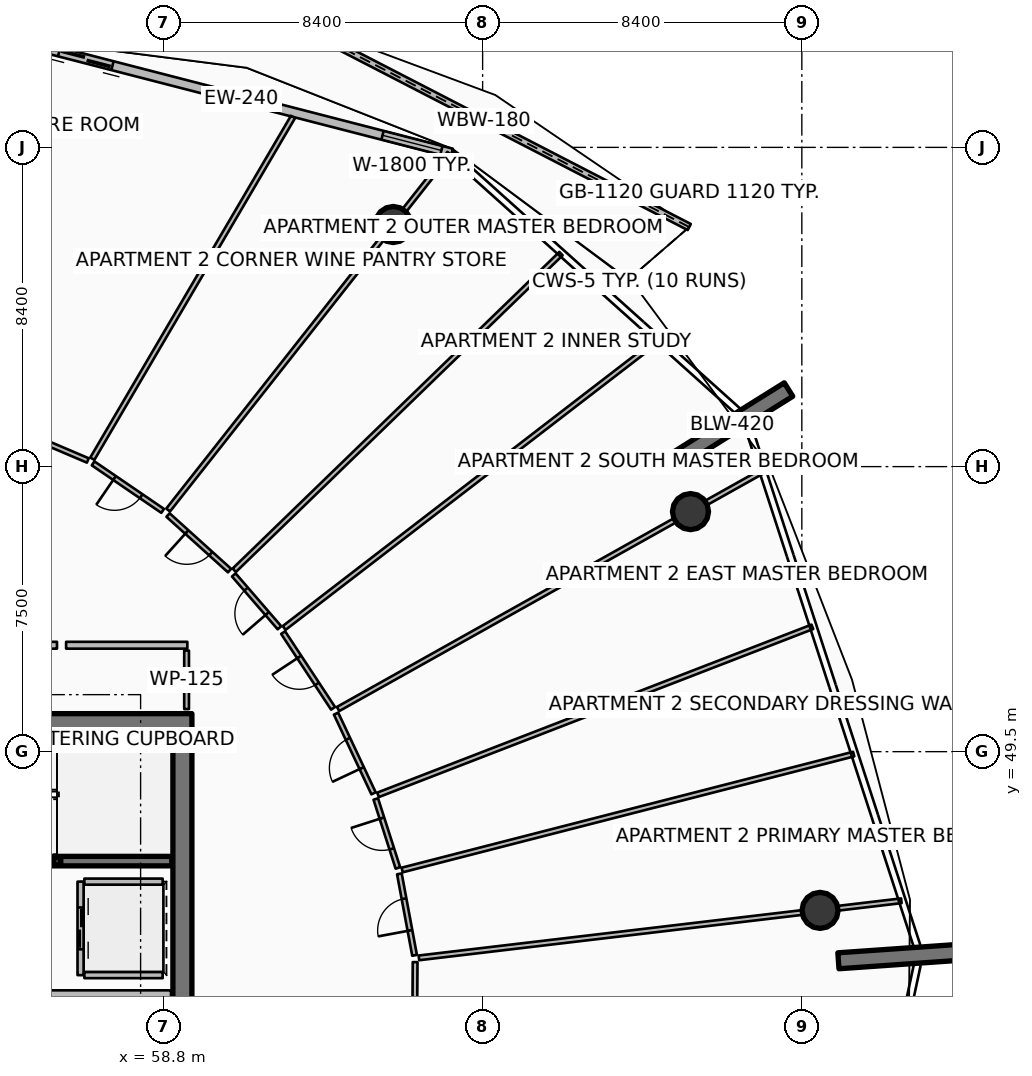
"""IFC4 building model, lengths in metres.
Left out: names, types, materials, properties, quantities, classifications, styles, units other than length and angle.
Written with IfcOpenShell. Run it as: python <this file> out.ifc"""

import sys

from ifc_helpers import new_model, si_unit, direction, frame, frame_2d, origin, origin_2d, place, context, subcontext, project, spatial, polyline, rectangle, hollow_rectangle, circle, outline, extrude, element, fill, save


model = new_model("IFC4")
c1 = context("Model", 3, precision=1e-05, world=origin(), true_north=direction((0.0, 1.0)))
c2 = subcontext(c1, "Body", "Model", "MODEL_VIEW")
j1 = project(units=[si_unit("LENGTHUNIT", "METRE"), si_unit("PLANEANGLEUNIT", "RADIAN")], contexts=[c1])
p1 = place(None, origin())
s1 = spatial("IfcSite", under=j1, at=p1, CompositionType="ELEMENT")
p2 = place(p1, origin())
s2 = spatial("IfcBuilding", under=s1, at=p2, CompositionType="ELEMENT")
p3 = place(p2, frame((0.0, 0.0, 302.15)))
s3 = spatial("IfcBuildingStorey", under=s2, at=p3, CompositionType="ELEMENT", Elevation=302.15)
p4 = place(p3, frame((49.95, 50.25, 0.0), z_axis=(0.0, 0.0, 1.0), x_axis=(1.0, 0.0, 0.0)))
e1 = element("IfcWall", 1, at=p4, inside=s3, PredefinedType="SHEAR", context=c2, shape_type="SweptSolid", body=[
    extrude(rectangle(XDim=9.6, YDim=0.5, at=frame_2d((4.8, 0.0))), origin(), (0.0, 0.0, 1.0), 3.85),
])
p5 = place(p3, frame((59.3, 34.0, 0.0), z_axis=(0.0, 0.0, 1.0), x_axis=(0.0, 1.0, 0.0)))
e2 = element("IfcWall", 2, at=p5, inside=s3, PredefinedType="SHEAR", context=c2, shape_type="SweptSolid", body=[
    extrude(rectangle(XDim=16.0, YDim=0.5, at=frame_2d((8.0, 0.0))), origin(), (0.0, 0.0, 1.0), 3.85),
])
p6 = place(p3, frame((56.0, 46.62, 0.0), z_axis=(0.0, 0.0, 1.0), x_axis=(1.0, 0.0, 0.0)))
e3 = element("IfcColumn", 3, at=p6, inside=s3, PredefinedType="COLUMN", context=c2, shape_type="SweptSolid", body=[
    extrude(hollow_rectangle(XDim=0.2, YDim=0.2, WallThickness=0.01, InnerFilletRadius=0.01, OuterFilletRadius=0.02, at=origin_2d()), origin(), (0.0, 0.0, 1.0), 1.72),
])
p7 = place(p3, frame((72.281, 57.173, 0.0), z_axis=(0.0, 0.0, 1.0), x_axis=(0.848033572426, 0.529942506352, 0.0)))
e4 = element("IfcWall", 4, at=p7, inside=s3, PredefinedType="SOLIDWALL", context=c2, shape_type="SweptSolid", body=[
    extrude(rectangle(XDim=3.5, YDim=0.42, at=frame_2d((1.75, 0.0))), origin(), (0.0, 0.0, 1.0), 3.85),
])
p8 = place(p3, frame((76.562, 43.997, 0.0), z_axis=(0.0, 0.0, 1.0), x_axis=(0.997563824095, 0.069759707979, 0.0)))
e5 = element("IfcWall", 5, at=p8, inside=s3, PredefinedType="SOLIDWALL", context=c2, shape_type="SweptSolid", body=[
    extrude(rectangle(XDim=3.5, YDim=0.42, at=frame_2d((1.75, 0.0))), origin(), (0.0, 0.0, 1.0), 3.85),
])
p9 = place(p3, frame((72.67, 55.816, 0.0), z_axis=(-0.282704029818, -0.158322289965, 0.94605099441), x_axis=(0.488622242654, -0.872495446397, 0.0)))
e6 = element("IfcColumn", 6, at=p9, inside=s3, PredefinedType="COLUMN", context=c2, shape_type="SweptSolid", body=[
    extrude(circle(Radius=0.475, at=origin_2d()), origin(), (0.0, 0.0, 1.0), 3.647),
])
p10 = place(p3, frame((64.847, 63.371, 0.0), z_axis=(-0.193753641648, -0.245837953919, 0.949749033567), x_axis=(0.78539361544, -0.618996663017, 0.0)))
e7 = element("IfcColumn", 7, at=p10, inside=s3, PredefinedType="COLUMN", context=c2, shape_type="SweptSolid", body=[
    extrude(circle(Radius=0.475, at=origin_2d()), origin(), (0.0, 0.0, 1.0), 3.633),
])
p11 = place(p3, frame((76.08, 45.323, 0.0), z_axis=(-0.321796334521, -0.038090724848, 0.946042396391), x_axis=(0.117548410709, -0.993067153389, 0.0)))
e8 = element("IfcColumn", 8, at=p11, inside=s3, PredefinedType="COLUMN", context=c2, shape_type="SweptSolid", body=[
    extrude(circle(Radius=0.475, at=origin_2d()), origin(), (0.0, 0.0, 1.0), 3.647),
])
p12 = place(p3, frame((72.637, 63.304, 0.0), z_axis=(0.0, 0.0, 1.0), x_axis=(-0.888586869338, 0.458708377556, 0.0)))
e9 = element("IfcWall", 9, at=p12, inside=s3, PredefinedType="PARAPET", context=c2, shape_type="SweptSolid", body=[
    extrude(outline(polyline([(0.0, 0.0), (12.16, 0.0), (12.16, 1.148), (6.08, 1.284), (0.0, 1.483), (0.0, 0.0)])), frame((0.0, 0.09, 0.0), z_axis=(0.0, -1.0, 0.0), x_axis=(1.0, 0.0, 0.0)), (0.0, 0.0, 1.0), 0.18),
])
p13 = place(p3, frame((66.386, 65.249, 0.0), z_axis=(0.0, 0.0, 1.0), x_axis=(-0.968343758421, 0.249620442927, 0.0)))
e10 = element("IfcWall", 10, at=p13, inside=s3, PredefinedType="SOLIDWALL", context=c2, shape_type="SweptSolid", body=[
    extrude(rectangle(XDim=11.438, YDim=0.24, at=frame_2d((5.719, 0.0))), origin(), (0.0, 0.0, 1.0), 2.4),
])
p14 = place(p13, frame((9.218, 0.0, 0.0)))
e11 = element("IfcOpeningElement", 11, at=p14, cuts=e10, PredefinedType="OPENING", context=c2, shape_type="SweptSolid", body=[
    extrude(rectangle(XDim=1.45, YDim=2.15, at=frame_2d((0.725, 1.075))), frame((0.0, 0.13, 0.0), z_axis=(0.0, -1.0, 0.0), x_axis=(1.0, 0.0, 0.0)), (0.0, 0.0, 1.0), 0.26),
])
p15 = place(p13, frame((0.28, 0.0, 0.65)))
e12 = element("IfcOpeningElement", 12, at=p15, cuts=e10, PredefinedType="OPENING", context=c2, shape_type="SweptSolid", body=[
    extrude(rectangle(XDim=1.6, YDim=1.5, at=frame_2d((0.8, 0.75))), frame((0.0, 0.13, 0.0), z_axis=(0.0, -1.0, 0.0), x_axis=(1.0, 0.0, 0.0)), (0.0, 0.0, 1.0), 0.26),
])
p16 = place(p3, frame((51.48, 46.62, 0.0), z_axis=(0.0, 0.0, 1.0), x_axis=(1.0, 0.0, 0.0)))
e13 = element("IfcWall", 13, at=p16, inside=s3, PredefinedType="SOLIDWALL", context=c2, shape_type="SweptSolid", body=[
    extrude(rectangle(XDim=7.54, YDim=0.25, at=frame_2d((3.77, 0.0))), origin(), (0.0, 0.0, 1.0), 3.45),
])
p17 = place(p16, frame((0.3, 0.0, 0.0)))
e14 = element("IfcOpeningElement", 14, at=p17, cuts=e13, PredefinedType="OPENING", context=c2, shape_type="SweptSolid", body=[
    extrude(rectangle(XDim=1.55, YDim=2.15, at=frame_2d((0.775, 1.075))), frame((0.0, 0.135, 0.0), z_axis=(0.0, -1.0, 0.0), x_axis=(1.0, 0.0, 0.0)), (0.0, 0.0, 1.0), 0.27),
])
p18 = place(p3, frame((56.62, 46.08, 0.0), z_axis=(0.0, 0.0, 1.0), x_axis=(0.0, -1.0, 0.0)))
e15 = element("IfcWall", 15, at=p18, inside=s3, PredefinedType="PARTITIONING", context=c2, shape_type="SweptSolid", body=[
    extrude(rectangle(XDim=2.46, YDim=0.16, at=frame_2d((1.23, 0.0))), origin(), (0.0, 0.0, 1.0), 3.45),
])
p19 = place(p18, frame((0.68, 0.0, 0.0)))
e16 = element("IfcOpeningElement", 16, at=p19, cuts=e15, PredefinedType="OPENING", context=c2, shape_type="SweptSolid", body=[
    extrude(rectangle(XDim=1.1, YDim=2.1, at=frame_2d((0.55, 1.05))), frame((0.0, 0.09, 0.0), z_axis=(0.0, -1.0, 0.0), x_axis=(1.0, 0.0, 0.0)), (0.0, 0.0, 1.0), 0.18),
])
for number, where, z_axis, x_axis in (
    (17, (56.72, 46.08, 0.0), (0.0, 0.0, 1.0), (1.0, 0.0, 0.0)),
    (18, (56.72, 43.62, 0.0), (0.0, 0.0, 1.0), (1.0, 0.0, 0.0)),
):
    element("IfcWall", number, at=place(p3, frame(where, z_axis=z_axis, x_axis=x_axis)), inside=s3, PredefinedType="PARTITIONING", context=c2, shape_type="SweptSolid", body=[
        extrude(rectangle(XDim=2.06, YDim=0.16, at=frame_2d((1.03, 0.0))), origin(), (0.0, 0.0, 1.0), 3.45),
    ])
p20 = place(p3, frame((50.12, 43.12, 0.0), z_axis=(0.0, 0.0, 1.0), x_axis=(1.0, 0.0, 0.0)))
e19 = element("IfcWall", 19, at=p20, inside=s3, PredefinedType="PARTITIONING", context=c2, shape_type="SweptSolid", body=[
    extrude(rectangle(XDim=8.88, YDim=0.2, at=frame_2d((4.44, 0.0))), origin(), (0.0, 0.0, 1.0), 3.45),
])
p21 = place(p3, frame((59.41, 50.62, 0.0), z_axis=(0.0, 0.0, 1.0), x_axis=(0.0, 1.0, 0.0)))
e20 = element("IfcWall", 20, at=p21, inside=s3, PredefinedType="PARTITIONING", context=c2, shape_type="SweptSolid", body=[
    extrude(rectangle(XDim=1.54, YDim=0.125, at=frame_2d((0.77, 0.0))), origin(), (0.0, 0.0, 1.0), 2.89),
])
p22 = place(p3, frame((65.398, 39.799, 0.0), z_axis=(0.0, 0.0, 1.0), x_axis=(0.006274064384, 0.999980317864, 0.0)))
e21 = element("IfcWall", 21, at=p22, inside=s3, PredefinedType="PARTITIONING", context=c2, shape_type="SweptSolid", body=[
    extrude(rectangle(XDim=4.164, YDim=0.125, at=frame_2d((2.082, 0.0))), origin(), (0.0, 0.0, 1.0), 2.407),
])
p23 = place(p22, frame((1.632, 0.0, 0.0)))
e22 = element("IfcOpeningElement", 22, at=p23, cuts=e21, PredefinedType="OPENING", context=c2, shape_type="SweptSolid", body=[
    extrude(rectangle(XDim=0.9, YDim=2.08, at=frame_2d((0.45, 1.04))), frame((0.0, 0.073, 0.0), z_axis=(0.0, -1.0, 0.0), x_axis=(1.0, 0.0, 0.0)), (0.0, 0.0, 1.0), 0.145),
])
p24 = place(p3, frame((65.524, 44.074, 0.0), z_axis=(0.0, 0.0, 1.0), x_axis=(0.993069543008, 0.117528221075, 0.0)))
e23 = element("IfcWall", 23, at=p24, inside=s3, PredefinedType="PARTITIONING", context=c2, shape_type="SweptSolid", body=[
    extrude(rectangle(XDim=12.784, YDim=0.125, at=frame_2d((6.392, 0.0))), origin(), (0.0, 0.0, 1.0), 2.407),
])
p25 = place(p3, frame((65.082, 46.386, 0.0), z_axis=(0.0, 0.0, 1.0), x_axis=(0.968583522114, 0.248688481217, 0.0)))
e24 = element("IfcWall", 24, at=p25, inside=s3, PredefinedType="PARTITIONING", context=c2, shape_type="SweptSolid", body=[
    extrude(rectangle(XDim=12.268, YDim=0.125, at=frame_2d((6.134, 0.0))), origin(), (0.0, 0.0, 1.0), 2.425),
])
p26 = place(p3, frame((64.448, 48.363, 0.0), z_axis=(0.0, 0.0, 1.0), x_axis=(0.93263774996, 0.360814117446, 0.0)))
e25 = element("IfcWall", 25, at=p26, inside=s3, PredefinedType="PARTITIONING", context=c2, shape_type="SweptSolid", body=[
    extrude(rectangle(XDim=12.254, YDim=0.125, at=frame_2d((6.127, 0.0))), origin(), (0.0, 0.0, 1.0), 2.425),
])
p27 = place(p3, frame((65.41, 44.141, 0.0), z_axis=(0.0, 0.0, 1.0), x_axis=(-0.183463941639, 0.983026440193, 0.0)))
e26 = element("IfcWall", 26, at=p27, inside=s3, PredefinedType="PARTITIONING", context=c2, shape_type="SweptSolid", body=[
    extrude(rectangle(XDim=2.181, YDim=0.125, at=frame_2d((1.091, 0.0))), origin(), (0.0, 0.0, 1.0), 2.407),
])
p28 = place(p27, frame((0.666, 0.0, 0.0)))
e27 = element("IfcOpeningElement", 27, at=p28, cuts=e26, PredefinedType="OPENING", context=c2, shape_type="SweptSolid", body=[
    extrude(rectangle(XDim=0.85, YDim=2.06, at=frame_2d((0.425, 1.03))), frame((0.0, 0.073, 0.0), z_axis=(0.0, -1.0, 0.0), x_axis=(1.0, 0.0, 0.0)), (0.0, 0.0, 1.0), 0.145),
])
p29 = place(p3, frame((64.97, 46.44, 0.0), z_axis=(0.0, 0.0, 1.0), x_axis=(-0.305370578234, 0.952233590013, 0.0)))
e28 = element("IfcWall", 28, at=p29, inside=s3, PredefinedType="PARTITIONING", context=c2, shape_type="SweptSolid", body=[
    extrude(rectangle(XDim=1.906, YDim=0.125, at=frame_2d((0.953, 0.0))), origin(), (0.0, 0.0, 1.0), 2.89),
])
p30 = place(p29, frame((0.528, 0.0, 0.0)))
e29 = element("IfcOpeningElement", 29, at=p30, cuts=e28, PredefinedType="OPENING", context=c2, shape_type="SweptSolid", body=[
    extrude(rectangle(XDim=0.85, YDim=2.06, at=frame_2d((0.425, 1.03))), frame((0.0, 0.073, 0.0), z_axis=(0.0, -1.0, 0.0), x_axis=(1.0, 0.0, 0.0)), (0.0, 0.0, 1.0), 0.145),
])
p31 = place(p3, frame((64.33, 48.403, 0.0), z_axis=(0.0, 0.0, 1.0), x_axis=(-0.425771678031, 0.904830635084, 0.0)))
e30 = element("IfcWall", 30, at=p31, inside=s3, PredefinedType="PARTITIONING", context=c2, shape_type="SweptSolid", body=[
    extrude(rectangle(XDim=2.318, YDim=0.125, at=frame_2d((1.159, 0.0))), origin(), (0.0, 0.0, 1.0), 2.407),
])
p32 = place(p31, frame((0.734, 0.0, 0.0)))
e31 = element("IfcOpeningElement", 31, at=p32, cuts=e30, PredefinedType="OPENING", context=c2, shape_type="SweptSolid", body=[
    extrude(rectangle(XDim=0.85, YDim=2.06, at=frame_2d((0.425, 1.03))), frame((0.0, 0.073, 0.0), z_axis=(0.0, -1.0, 0.0), x_axis=(1.0, 0.0, 0.0)), (0.0, 0.0, 1.0), 0.145),
])
p33 = place(p3, frame((59.43, 52.3, 0.0), z_axis=(0.0, 0.0, 1.0), x_axis=(-1.0, 0.0, 0.0)))
e32 = element("IfcWall", 32, at=p33, inside=s3, PredefinedType="PARTITIONING", context=c2, shape_type="SweptSolid", body=[
    extrude(rectangle(XDim=3.19, YDim=0.18, at=frame_2d((1.595, 0.0))), origin(), (0.0, 0.0, 1.0), 2.407),
])
p34 = place(p3, frame((63.396, 50.622, 0.0), z_axis=(0.0, 0.0, 1.0), x_axis=(0.872499176967, 0.4886155812, 0.0)))
e33 = element("IfcWall", 33, at=p34, inside=s3, PredefinedType="PARTITIONING", context=c2, shape_type="SweptSolid", body=[
    extrude(rectangle(XDim=12.784, YDim=0.125, at=frame_2d((6.392, 0.0))), origin(), (0.0, 0.0, 1.0), 2.407),
])
p35 = place(p3, frame((61.978, 52.754, 0.0), z_axis=(0.0, 0.0, 1.0), x_axis=(0.792559605076, 0.609794450944, 0.0)))
e34 = element("IfcWall", 34, at=p35, inside=s3, PredefinedType="PARTITIONING", context=c2, shape_type="SweptSolid", body=[
    extrude(rectangle(XDim=12.406, YDim=0.125, at=frame_2d((6.203, 0.0))), origin(), (0.0, 0.0, 1.0), 2.425),
])
p36 = place(p3, frame((60.665, 54.273, 0.0), z_axis=(0.0, 0.0, 1.0), x_axis=(0.718133524399, 0.695905339205, 0.0)))
e35 = element("IfcWall", 35, at=p36, inside=s3, PredefinedType="PARTITIONING", context=c2, shape_type="SweptSolid", body=[
    extrude(rectangle(XDim=11.972, YDim=0.125, at=frame_2d((5.986, 0.0))), origin(), (0.0, 0.0, 1.0), 2.425),
])
p37 = place(p3, frame((63.265, 50.64, 0.0), z_axis=(0.0, 0.0, 1.0), x_axis=(-0.550634170063, 0.834746674602, 0.0)))
e36 = element("IfcWall", 36, at=p37, inside=s3, PredefinedType="PARTITIONING", context=c2, shape_type="SweptSolid", body=[
    extrude(rectangle(XDim=2.387, YDim=0.125, at=frame_2d((1.194, 0.0))), origin(), (0.0, 0.0, 1.0), 2.407),
])
p38 = place(p37, frame((0.769, 0.0, 0.0)))
e37 = element("IfcOpeningElement", 37, at=p38, cuts=e36, PredefinedType="OPENING", context=c2, shape_type="SweptSolid", body=[
    extrude(rectangle(XDim=0.85, YDim=2.06, at=frame_2d((0.425, 1.03))), frame((0.0, 0.073, 0.0), z_axis=(0.0, -1.0, 0.0), x_axis=(1.0, 0.0, 0.0)), (0.0, 0.0, 1.0), 0.145),
])
p39 = place(p3, frame((61.854, 52.76, 0.0), z_axis=(0.0, 0.0, 1.0), x_axis=(-0.653948493608, 0.756539072162, 0.0)))
e38 = element("IfcWall", 38, at=p39, inside=s3, PredefinedType="PARTITIONING", context=c2, shape_type="SweptSolid", body=[
    extrude(rectangle(XDim=1.837, YDim=0.125, at=frame_2d((0.918, 0.0))), origin(), (0.0, 0.0, 1.0), 2.89),
])
p40 = place(p39, frame((0.494, 0.0, 0.0)))
e39 = element("IfcOpeningElement", 39, at=p40, cuts=e38, PredefinedType="OPENING", context=c2, shape_type="SweptSolid", body=[
    extrude(rectangle(XDim=0.85, YDim=2.06, at=frame_2d((0.425, 1.03))), frame((0.0, 0.073, 0.0), z_axis=(0.0, -1.0, 0.0), x_axis=(1.0, 0.0, 0.0)), (0.0, 0.0, 1.0), 0.145),
])
p41 = place(p3, frame((60.541, 54.264, 0.0), z_axis=(0.0, 0.0, 1.0), x_axis=(-0.742235558018, 0.670139072443, 0.0)))
e40 = element("IfcWall", 40, at=p41, inside=s3, PredefinedType="PARTITIONING", context=c2, shape_type="SweptSolid", body=[
    extrude(rectangle(XDim=2.181, YDim=0.125, at=frame_2d((1.09, 0.0))), origin(), (0.0, 0.0, 1.0), 2.407),
])
p42 = place(p41, frame((0.666, 0.0, 0.0)))
e41 = element("IfcOpeningElement", 41, at=p42, cuts=e40, PredefinedType="OPENING", context=c2, shape_type="SweptSolid", body=[
    extrude(rectangle(XDim=0.85, YDim=2.06, at=frame_2d((0.425, 1.03))), frame((0.0, 0.073, 0.0), z_axis=(0.0, -1.0, 0.0), x_axis=(1.0, 0.0, 0.0)), (0.0, 0.0, 1.0), 0.145),
])
p43 = place(p3, frame((56.0, 52.3, 0.0), z_axis=(0.0, 0.0, 1.0), x_axis=(-1.0, 0.0, 0.0)))
e42 = element("IfcWall", 42, at=p43, inside=s3, PredefinedType="PARTITIONING", context=c2, shape_type="SweptSolid", body=[
    extrude(rectangle(XDim=4.975, YDim=0.18, at=frame_2d((2.488, 0.0))), origin(), (0.0, 0.0, 1.0), 2.407),
])
p44 = place(p3, frame((58.925, 55.858, 0.0), z_axis=(0.0, 0.0, 1.0), x_axis=(0.619092993306, 0.785317684532, 0.0)))
e43 = element("IfcWall", 43, at=p44, inside=s3, PredefinedType="PARTITIONING", context=c2, shape_type="SweptSolid", body=[
    extrude(rectangle(XDim=11.95, YDim=0.125, at=frame_2d((5.975, 0.0))), origin(), (0.0, 0.0, 1.0), 2.407),
])
p45 = place(p3, frame((56.93, 57.208, 0.0), z_axis=(0.0, 0.0, 1.0), x_axis=(0.506337583603, 0.862335347432, 0.0)))
e44 = element("IfcWall", 44, at=p45, inside=s3, PredefinedType="PARTITIONING", context=c2, shape_type="SweptSolid", body=[
    extrude(rectangle(XDim=10.429, YDim=0.125, at=frame_2d((5.214, 0.0))), origin(), (0.0, 0.0, 1.0), 2.425),
])
p46 = place(p3, frame((58.78, 55.836, 0.0), z_axis=(0.0, 0.0, 1.0), x_axis=(-0.825777202557, 0.563996464295, 0.0)))
e45 = element("IfcWall", 45, at=p46, inside=s3, PredefinedType="PARTITIONING", context=c2, shape_type="SweptSolid", body=[
    extrude(rectangle(XDim=2.216, YDim=0.125, at=frame_2d((1.108, 0.0))), origin(), (0.0, 0.0, 1.0), 2.407),
])
p47 = place(p46, frame((0.683, 0.0, 0.0)))
e46 = element("IfcOpeningElement", 46, at=p47, cuts=e45, PredefinedType="OPENING", context=c2, shape_type="SweptSolid", body=[
    extrude(rectangle(XDim=0.85, YDim=2.06, at=frame_2d((0.425, 1.03))), frame((0.0, 0.073, 0.0), z_axis=(0.0, -1.0, 0.0), x_axis=(1.0, 0.0, 0.0)), (0.0, 0.0, 1.0), 0.145),
])
p48 = place(p3, frame((56.811, 57.162, 0.0), z_axis=(0.0, 0.0, 1.0), x_axis=(-0.919947770822, 0.392040940414, 0.0)))
e47 = element("IfcWall", 47, at=p48, inside=s3, PredefinedType="PARTITIONING", context=c2, shape_type="SweptSolid", body=[
    extrude(rectangle(XDim=4.3, YDim=0.125, at=frame_2d((2.15, 0.0))), origin(), (0.0, 0.0, 1.0), 2.407),
])
p49 = place(p48, frame((1.7, 0.0, 0.0)))
e48 = element("IfcOpeningElement", 48, at=p49, cuts=e47, PredefinedType="OPENING", context=c2, shape_type="SweptSolid", body=[
    extrude(rectangle(XDim=0.9, YDim=2.08, at=frame_2d((0.45, 1.04))), frame((0.0, 0.073, 0.0), z_axis=(0.0, -1.0, 0.0), x_axis=(1.0, 0.0, 0.0)), (0.0, 0.0, 1.0), 0.145),
])
p50 = place(p14, origin())
e49 = element("IfcDoor", 49, at=p50, inside=s3, OperationType="DOUBLE_DOOR_SLIDING", PredefinedType="DOOR", context=c2, shape_type="SweptSolid", body=[
    extrude(rectangle(XDim=1.45, YDim=2.15, at=frame_2d((0.725, 1.075))), frame((0.0, 0.025, 0.0), z_axis=(0.0, -1.0, 0.0), x_axis=(1.0, 0.0, 0.0)), (0.0, 0.0, 1.0), 0.05),
])
fill(e11, e49)
p51 = place(p15, origin())
e50 = element("IfcWindow", 50, at=p51, inside=s3, PartitioningType="SINGLE_PANEL", PredefinedType="WINDOW", context=c2, shape_type="SweptSolid", body=[
    extrude(rectangle(XDim=1.6, YDim=1.5, at=frame_2d((0.8, 0.75))), frame((0.0, 0.03, 0.0), z_axis=(0.0, -1.0, 0.0), x_axis=(1.0, 0.0, 0.0)), (0.0, 0.0, 1.0), 0.06),
])
fill(e12, e50)
p52 = place(p19, origin())
e51 = element("IfcDoor", 51, at=p52, inside=s3, OperationType="DOUBLE_DOOR_SLIDING", PredefinedType="DOOR", context=c2, shape_type="SweptSolid", body=[
    extrude(rectangle(XDim=1.1, YDim=2.1, at=frame_2d((0.55, 1.05))), frame((0.0, 0.025, 0.0), z_axis=(0.0, -1.0, 0.0), x_axis=(1.0, 0.0, 0.0)), (0.0, 0.0, 1.0), 0.05),
])
fill(e16, e51)
p53 = place(p28, origin())
e52 = element("IfcDoor", 52, at=p53, inside=s3, OperationType="SINGLE_SWING_LEFT", PredefinedType="DOOR", context=c2, shape_type="SweptSolid", body=[
    extrude(rectangle(XDim=0.85, YDim=2.06, at=frame_2d((0.425, 1.03))), frame((0.0, 0.025, 0.0), z_axis=(0.0, -1.0, 0.0), x_axis=(1.0, 0.0, 0.0)), (0.0, 0.0, 1.0), 0.05),
])
fill(e27, e52)
p54 = place(p30, origin())
e53 = element("IfcDoor", 53, at=p54, inside=s3, OperationType="SINGLE_SWING_RIGHT", PredefinedType="DOOR", context=c2, shape_type="SweptSolid", body=[
    extrude(rectangle(XDim=0.85, YDim=2.06, at=frame_2d((0.425, 1.03))), frame((0.0, 0.025, 0.0), z_axis=(0.0, -1.0, 0.0), x_axis=(1.0, 0.0, 0.0)), (0.0, 0.0, 1.0), 0.05),
])
fill(e29, e53)
p55 = place(p32, origin())
e54 = element("IfcDoor", 54, at=p55, inside=s3, OperationType="SINGLE_SWING_LEFT", PredefinedType="DOOR", context=c2, shape_type="SweptSolid", body=[
    extrude(rectangle(XDim=0.85, YDim=2.06, at=frame_2d((0.425, 1.03))), frame((0.0, 0.025, 0.0), z_axis=(0.0, -1.0, 0.0), x_axis=(1.0, 0.0, 0.0)), (0.0, 0.0, 1.0), 0.05),
])
fill(e31, e54)
p56 = place(p38, origin())
e55 = element("IfcDoor", 55, at=p56, inside=s3, OperationType="SINGLE_SWING_RIGHT", PredefinedType="DOOR", context=c2, shape_type="SweptSolid", body=[
    extrude(rectangle(XDim=0.85, YDim=2.06, at=frame_2d((0.425, 1.03))), frame((0.0, 0.025, 0.0), z_axis=(0.0, -1.0, 0.0), x_axis=(1.0, 0.0, 0.0)), (0.0, 0.0, 1.0), 0.05),
])
fill(e37, e55)
p57 = place(p40, origin())
e56 = element("IfcDoor", 56, at=p57, inside=s3, OperationType="SINGLE_SWING_LEFT", PredefinedType="DOOR", context=c2, shape_type="SweptSolid", body=[
    extrude(rectangle(XDim=0.85, YDim=2.06, at=frame_2d((0.425, 1.03))), frame((0.0, 0.025, 0.0), z_axis=(0.0, -1.0, 0.0), x_axis=(1.0, 0.0, 0.0)), (0.0, 0.0, 1.0), 0.05),
])
fill(e39, e56)
p58 = place(p42, origin())
e57 = element("IfcDoor", 57, at=p58, inside=s3, OperationType="SINGLE_SWING_RIGHT", PredefinedType="DOOR", context=c2, shape_type="SweptSolid", body=[
    extrude(rectangle(XDim=0.85, YDim=2.06, at=frame_2d((0.425, 1.03))), frame((0.0, 0.025, 0.0), z_axis=(0.0, -1.0, 0.0), x_axis=(1.0, 0.0, 0.0)), (0.0, 0.0, 1.0), 0.05),
])
fill(e41, e57)
p59 = place(p47, origin())
e58 = element("IfcDoor", 58, at=p59, inside=s3, OperationType="SINGLE_SWING_RIGHT", PredefinedType="DOOR", context=c2, shape_type="SweptSolid", body=[
    extrude(rectangle(XDim=0.85, YDim=2.06, at=frame_2d((0.425, 1.03))), frame((0.0, 0.025, 0.0), z_axis=(0.0, -1.0, 0.0), x_axis=(1.0, 0.0, 0.0)), (0.0, 0.0, 1.0), 0.05),
])
fill(e46, e58)
save(model, sys.argv[1])
